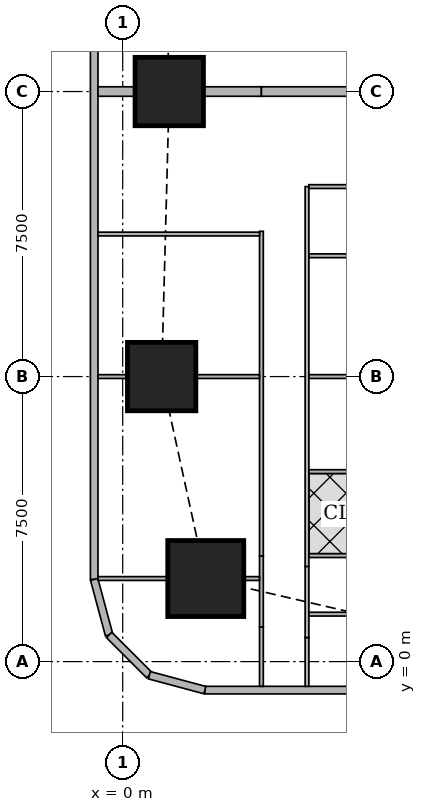
"""IFC4 building model, lengths in metres.
Left out: names, types, materials, properties, quantities, classifications, styles, units other than length and angle.
Written with IfcOpenShell. Run it as: python <this file> out.ifc"""

import sys

from ifc_helpers import new_model, si_unit, direction, frame, frame_2d, origin, origin_2d, place, context, subcontext, project, spatial, rectangle, extrude, element, fill, save


model = new_model("IFC4")
c1 = context("Model", 3, precision=1e-05, world=origin(), true_north=direction((0.0, 1.0)))
c2 = subcontext(c1, "Body", "Model", "MODEL_VIEW")
j1 = project(units=[si_unit("LENGTHUNIT", "METRE"), si_unit("PLANEANGLEUNIT", "RADIAN")], contexts=[c1])
p1 = place(None, origin())
s1 = spatial("IfcSite", under=j1, at=p1, CompositionType="ELEMENT")
p2 = place(p1, origin())
s2 = spatial("IfcBuilding", under=s1, at=p2, CompositionType="ELEMENT")
p3 = place(p2, frame((0.0, 0.0, 169.55)))
s3 = spatial("IfcBuildingStorey", under=s2, at=p3, CompositionType="ELEMENT", Elevation=169.55)
p4 = place(p3, frame((2.186, 2.186, 0.0), z_axis=(0.0, 0.0, 1.0), x_axis=(1.0, 0.0, 0.0)))
e1 = element("IfcColumn", 1, at=p4, inside=s3, PredefinedType="COLUMN", context=c2, shape_type="SweptSolid", body=[
    extrude(rectangle(XDim=2.0, YDim=2.0, at=origin_2d()), origin(), (0.0, 0.0, 1.0), 3.75),
])
for number, where, z_axis, x_axis in (
    (2, (1.025, 7.5, 0.0), (0.0, 0.0, 1.0), (1.0, 0.0, 0.0)),
    (3, (1.225, 15.0, 0.0), (0.0, 0.0, 1.0), (1.0, 0.0, 0.0)),
):
    element("IfcColumn", number, at=place(p3, frame(where, z_axis=z_axis, x_axis=x_axis)), inside=s3, PredefinedType="COLUMN", context=c2, shape_type="SweptSolid", body=[
        extrude(rectangle(XDim=1.8, YDim=1.8, at=origin_2d()), origin(), (0.0, 0.0, 1.0), 3.75),
    ])
p5 = place(p3, frame((2.163, -0.75, 0.0), z_axis=(0.0, 0.0, 1.0), x_axis=(1.0, 0.0, 0.0)))
e4 = element("IfcWall", 4, at=p5, inside=s3, PredefinedType="SOLIDWALL", context=c2, shape_type="SweptSolid", body=[
    extrude(rectangle(XDim=45.628, YDim=0.2, at=frame_2d((22.814, 0.0))), origin(), (0.0, 0.0, 1.0), 3.5),
])
p6 = place(p5, frame((9.537, 0.0, 0.9)))
e5 = element("IfcOpeningElement", 5, at=p6, cuts=e4, PredefinedType="OPENING", context=c2, shape_type="SweptSolid", body=[
    extrude(rectangle(XDim=1.8, YDim=1.5, at=frame_2d((0.9, 0.75))), frame((0.0, 0.11, 0.0), z_axis=(0.0, -1.0, 0.0), x_axis=(1.0, 0.0, 0.0)), (0.0, 0.0, 1.0), 0.22),
])
p7 = place(p5, frame((13.137, 0.0, 0.9)))
e6 = element("IfcOpeningElement", 6, at=p7, cuts=e4, PredefinedType="OPENING", context=c2, shape_type="SweptSolid", body=[
    extrude(rectangle(XDim=1.8, YDim=1.5, at=frame_2d((0.9, 0.75))), frame((0.0, 0.11, 0.0), z_axis=(0.0, -1.0, 0.0), x_axis=(1.0, 0.0, 0.0)), (0.0, 0.0, 1.0), 0.22),
])
p8 = place(p5, frame((16.737, 0.0, 0.9)))
e7 = element("IfcOpeningElement", 7, at=p8, cuts=e4, PredefinedType="OPENING", context=c2, shape_type="SweptSolid", body=[
    extrude(rectangle(XDim=1.8, YDim=1.5, at=frame_2d((0.9, 0.75))), frame((0.0, 0.11, 0.0), z_axis=(0.0, -1.0, 0.0), x_axis=(1.0, 0.0, 0.0)), (0.0, 0.0, 1.0), 0.22),
])
p9 = place(p5, frame((20.337, 0.0, 0.9)))
e8 = element("IfcOpeningElement", 8, at=p9, cuts=e4, PredefinedType="OPENING", context=c2, shape_type="SweptSolid", body=[
    extrude(rectangle(XDim=1.8, YDim=1.5, at=frame_2d((0.9, 0.75))), frame((0.0, 0.11, 0.0), z_axis=(0.0, -1.0, 0.0), x_axis=(1.0, 0.0, 0.0)), (0.0, 0.0, 1.0), 0.22),
])
p10 = place(p5, frame((23.937, 0.0, 0.9)))
e9 = element("IfcOpeningElement", 9, at=p10, cuts=e4, PredefinedType="OPENING", context=c2, shape_type="SweptSolid", body=[
    extrude(rectangle(XDim=1.8, YDim=1.5, at=frame_2d((0.9, 0.75))), frame((0.0, 0.11, 0.0), z_axis=(0.0, -1.0, 0.0), x_axis=(1.0, 0.0, 0.0)), (0.0, 0.0, 1.0), 0.22),
])
p11 = place(p5, frame((27.537, 0.0, 0.9)))
e10 = element("IfcOpeningElement", 10, at=p11, cuts=e4, PredefinedType="OPENING", context=c2, shape_type="SweptSolid", body=[
    extrude(rectangle(XDim=1.8, YDim=1.5, at=frame_2d((0.9, 0.75))), frame((0.0, 0.11, 0.0), z_axis=(0.0, -1.0, 0.0), x_axis=(1.0, 0.0, 0.0)), (0.0, 0.0, 1.0), 0.22),
])
p12 = place(p5, frame((31.137, 0.0, 0.9)))
e11 = element("IfcOpeningElement", 11, at=p12, cuts=e4, PredefinedType="OPENING", context=c2, shape_type="SweptSolid", body=[
    extrude(rectangle(XDim=1.8, YDim=1.5, at=frame_2d((0.9, 0.75))), frame((0.0, 0.11, 0.0), z_axis=(0.0, -1.0, 0.0), x_axis=(1.0, 0.0, 0.0)), (0.0, 0.0, 1.0), 0.22),
])
p13 = place(p5, frame((34.737, 0.0, 0.9)))
e12 = element("IfcOpeningElement", 12, at=p13, cuts=e4, PredefinedType="OPENING", context=c2, shape_type="SweptSolid", body=[
    extrude(rectangle(XDim=1.8, YDim=1.5, at=frame_2d((0.9, 0.75))), frame((0.0, 0.11, 0.0), z_axis=(0.0, -1.0, 0.0), x_axis=(1.0, 0.0, 0.0)), (0.0, 0.0, 1.0), 0.22),
])
p14 = place(p3, frame((-0.75, 42.837, 0.0), z_axis=(0.0, 0.0, 1.0), x_axis=(0.0, -1.0, 0.0)))
e13 = element("IfcWall", 13, at=p14, inside=s3, PredefinedType="SOLIDWALL", context=c2, shape_type="SweptSolid", body=[
    extrude(rectangle(XDim=40.674, YDim=0.2, at=frame_2d((20.337, 0.0))), origin(), (0.0, 0.0, 1.0), 3.5),
])
p15 = place(p14, frame((1.78, 0.0, 0.9)))
e14 = element("IfcOpeningElement", 14, at=p15, cuts=e13, PredefinedType="OPENING", context=c2, shape_type="SweptSolid", body=[
    extrude(rectangle(XDim=1.8, YDim=1.5, at=frame_2d((0.9, 0.75))), frame((0.0, 0.11, 0.0), z_axis=(0.0, -1.0, 0.0), x_axis=(1.0, 0.0, 0.0)), (0.0, 0.0, 1.0), 0.22),
])
p16 = place(p14, frame((6.312, 0.0, 0.9)))
e15 = element("IfcOpeningElement", 15, at=p16, cuts=e13, PredefinedType="OPENING", context=c2, shape_type="SweptSolid", body=[
    extrude(rectangle(XDim=1.8, YDim=1.5, at=frame_2d((0.9, 0.75))), frame((0.0, 0.11, 0.0), z_axis=(0.0, -1.0, 0.0), x_axis=(1.0, 0.0, 0.0)), (0.0, 0.0, 1.0), 0.22),
])
p17 = place(p14, frame((10.062, 0.0, 0.9)))
e16 = element("IfcOpeningElement", 16, at=p17, cuts=e13, PredefinedType="OPENING", context=c2, shape_type="SweptSolid", body=[
    extrude(rectangle(XDim=1.8, YDim=1.5, at=frame_2d((0.9, 0.75))), frame((0.0, 0.11, 0.0), z_axis=(0.0, -1.0, 0.0), x_axis=(1.0, 0.0, 0.0)), (0.0, 0.0, 1.0), 0.22),
])
p18 = place(p14, frame((13.812, 0.0, 0.9)))
e17 = element("IfcOpeningElement", 17, at=p18, cuts=e13, PredefinedType="OPENING", context=c2, shape_type="SweptSolid", body=[
    extrude(rectangle(XDim=1.8, YDim=1.5, at=frame_2d((0.9, 0.75))), frame((0.0, 0.11, 0.0), z_axis=(0.0, -1.0, 0.0), x_axis=(1.0, 0.0, 0.0)), (0.0, 0.0, 1.0), 0.22),
])
p19 = place(p14, frame((17.562, 0.0, 0.9)))
e18 = element("IfcOpeningElement", 18, at=p19, cuts=e13, PredefinedType="OPENING", context=c2, shape_type="SweptSolid", body=[
    extrude(rectangle(XDim=1.8, YDim=1.5, at=frame_2d((0.9, 0.75))), frame((0.0, 0.11, 0.0), z_axis=(0.0, -1.0, 0.0), x_axis=(1.0, 0.0, 0.0)), (0.0, 0.0, 1.0), 0.22),
])
p20 = place(p14, frame((21.312, 0.0, 0.9)))
e19 = element("IfcOpeningElement", 19, at=p20, cuts=e13, PredefinedType="OPENING", context=c2, shape_type="SweptSolid", body=[
    extrude(rectangle(XDim=1.8, YDim=1.5, at=frame_2d((0.9, 0.75))), frame((0.0, 0.11, 0.0), z_axis=(0.0, -1.0, 0.0), x_axis=(1.0, 0.0, 0.0)), (0.0, 0.0, 1.0), 0.22),
])
p21 = place(p14, frame((25.062, 0.0, 0.9)))
e20 = element("IfcOpeningElement", 20, at=p21, cuts=e13, PredefinedType="OPENING", context=c2, shape_type="SweptSolid", body=[
    extrude(rectangle(XDim=1.8, YDim=1.5, at=frame_2d((0.9, 0.75))), frame((0.0, 0.11, 0.0), z_axis=(0.0, -1.0, 0.0), x_axis=(1.0, 0.0, 0.0)), (0.0, 0.0, 1.0), 0.22),
])
p22 = place(p14, frame((28.812, 0.0, 0.9)))
e21 = element("IfcOpeningElement", 21, at=p22, cuts=e13, PredefinedType="OPENING", context=c2, shape_type="SweptSolid", body=[
    extrude(rectangle(XDim=1.8, YDim=1.5, at=frame_2d((0.9, 0.75))), frame((0.0, 0.11, 0.0), z_axis=(0.0, -1.0, 0.0), x_axis=(1.0, 0.0, 0.0)), (0.0, 0.0, 1.0), 0.22),
])
p23 = place(p14, frame((32.562, 0.0, 0.9)))
e22 = element("IfcOpeningElement", 22, at=p23, cuts=e13, PredefinedType="OPENING", context=c2, shape_type="SweptSolid", body=[
    extrude(rectangle(XDim=1.8, YDim=1.5, at=frame_2d((0.9, 0.75))), frame((0.0, 0.11, 0.0), z_axis=(0.0, -1.0, 0.0), x_axis=(1.0, 0.0, 0.0)), (0.0, 0.0, 1.0), 0.22),
])
p24 = place(p14, frame((37.094, 0.0, 0.9)))
e23 = element("IfcOpeningElement", 23, at=p24, cuts=e13, PredefinedType="OPENING", context=c2, shape_type="SweptSolid", body=[
    extrude(rectangle(XDim=1.8, YDim=1.5, at=frame_2d((0.9, 0.75))), frame((0.0, 0.11, 0.0), z_axis=(0.0, -1.0, 0.0), x_axis=(1.0, 0.0, 0.0)), (0.0, 0.0, 1.0), 0.22),
])
p25 = place(p3, frame((-0.75, 2.163, 0.0), z_axis=(0.0, 0.0, 1.0), x_axis=(0.259168954497, -0.965832000415, 0.0)))
e24 = element("IfcWall", 24, at=p25, inside=s3, PredefinedType="SOLIDWALL", context=c2, shape_type="SweptSolid", body=[
    extrude(rectangle(XDim=1.513, YDim=0.2, at=frame_2d((0.756, 0.0))), origin(), (0.0, 0.0, 1.0), 3.5),
])
p26 = place(p3, frame((-0.358, 0.702, 0.0), z_axis=(0.0, 0.0, 1.0), x_axis=(0.707106781187, -0.707106781187, 0.0)))
e25 = element("IfcWall", 25, at=p26, inside=s3, PredefinedType="SOLIDWALL", context=c2, shape_type="SweptSolid", body=[
    extrude(rectangle(XDim=1.499, YDim=0.2, at=frame_2d((0.75, 0.0))), origin(), (0.0, 0.0, 1.0), 3.5),
])
p27 = place(p3, frame((0.702, -0.358, 0.0), z_axis=(0.0, 0.0, 1.0), x_axis=(0.965832000415, -0.259168954497, 0.0)))
e26 = element("IfcWall", 26, at=p27, inside=s3, PredefinedType="SOLIDWALL", context=c2, shape_type="SweptSolid", body=[
    extrude(rectangle(XDim=1.513, YDim=0.2, at=frame_2d((0.756, 0.0))), origin(), (0.0, 0.0, 1.0), 3.5),
])
p28 = place(p3, frame((3.65, -0.65, 0.0), z_axis=(0.0, 0.0, 1.0), x_axis=(0.0, 1.0, 0.0)))
e27 = element("IfcWall", 27, at=p28, inside=s3, PredefinedType="PARTITIONING", context=c2, shape_type="SweptSolid", body=[
    extrude(rectangle(XDim=1.562, YDim=0.1, at=frame_2d((0.781, 0.0))), origin(), (0.0, 0.0, 1.0), 3.5),
])
p29 = place(p3, frame((3.65, 0.912, 0.0), z_axis=(0.0, 0.0, 1.0), x_axis=(0.0, 1.0, 0.0)))
e28 = element("IfcWall", 28, at=p29, inside=s3, PredefinedType="PARTITIONING", context=c2, shape_type="SweptSolid", body=[
    extrude(rectangle(XDim=1.87, YDim=0.1, at=frame_2d((0.935, 0.0))), origin(), (0.0, 0.0, 1.0), 2.1),
])
p30 = place(p3, frame((3.65, 2.782, 0.0), z_axis=(0.0, 0.0, 1.0), x_axis=(0.0, 1.0, 0.0)))
e29 = element("IfcWall", 29, at=p30, inside=s3, PredefinedType="PARTITIONING", context=c2, shape_type="SweptSolid", body=[
    extrude(rectangle(XDim=8.541, YDim=0.1, at=frame_2d((4.271, 0.0))), origin(), (0.0, 0.0, 1.0), 3.5),
])
p31 = place(p30, frame((7.368, 0.0, 0.0)))
e30 = element("IfcOpeningElement", 30, at=p31, cuts=e29, PredefinedType="OPENING", context=c2, shape_type="SweptSolid", body=[
    extrude(rectangle(XDim=0.9, YDim=2.1, at=frame_2d((0.45, 1.05))), frame((0.0, 0.06, 0.0), z_axis=(0.0, -1.0, 0.0), x_axis=(1.0, 0.0, 0.0)), (0.0, 0.0, 1.0), 0.12),
])
p32 = place(p30, frame((3.618, 0.0, 0.0)))
e31 = element("IfcOpeningElement", 31, at=p32, cuts=e29, PredefinedType="OPENING", context=c2, shape_type="SweptSolid", body=[
    extrude(rectangle(XDim=0.9, YDim=2.1, at=frame_2d((0.45, 1.05))), frame((0.0, 0.06, 0.0), z_axis=(0.0, -1.0, 0.0), x_axis=(1.0, 0.0, 0.0)), (0.0, 0.0, 1.0), 0.12),
])
p33 = place(p3, frame((4.85, -0.65, 0.0), z_axis=(0.0, 0.0, 1.0), x_axis=(0.0, 1.0, 0.0)))
e32 = element("IfcWall", 32, at=p33, inside=s3, PredefinedType="PARTITIONING", context=c2, shape_type="SweptSolid", body=[
    extrude(rectangle(XDim=1.284, YDim=0.1, at=frame_2d((0.642, 0.0))), origin(), (0.0, 0.0, 1.0), 3.5),
])
p34 = place(p33, frame((0.234, 0.0, 0.0)))
e33 = element("IfcOpeningElement", 33, at=p34, cuts=e32, PredefinedType="OPENING", context=c2, shape_type="SweptSolid", body=[
    extrude(rectangle(XDim=0.9, YDim=2.1, at=frame_2d((0.45, 1.05))), frame((0.0, 0.06, 0.0), z_axis=(0.0, -1.0, 0.0), x_axis=(1.0, 0.0, 0.0)), (0.0, 0.0, 1.0), 0.12),
])
p35 = place(p3, frame((4.85, 0.634, 0.0), z_axis=(0.0, 0.0, 1.0), x_axis=(0.0, 1.0, 0.0)))
e34 = element("IfcWall", 34, at=p35, inside=s3, PredefinedType="PARTITIONING", context=c2, shape_type="SweptSolid", body=[
    extrude(rectangle(XDim=1.871, YDim=0.1, at=frame_2d((0.936, 0.0))), origin(), (0.0, 0.0, 1.0), 2.1),
])
p36 = place(p3, frame((4.85, 2.505, 0.0), z_axis=(0.0, 0.0, 1.0), x_axis=(0.0, 1.0, 0.0)))
e35 = element("IfcWall", 35, at=p36, inside=s3, PredefinedType="PARTITIONING", context=c2, shape_type="SweptSolid", body=[
    extrude(rectangle(XDim=9.994, YDim=0.1, at=frame_2d((4.997, 0.0))), origin(), (0.0, 0.0, 1.0), 3.5),
])
p37 = place(p36, frame((8.634, 0.0, 0.0)))
e36 = element("IfcOpeningElement", 36, at=p37, cuts=e35, PredefinedType="OPENING", context=c2, shape_type="SweptSolid", body=[
    extrude(rectangle(XDim=0.9, YDim=2.1, at=frame_2d((0.45, 1.05))), frame((0.0, 0.06, 0.0), z_axis=(0.0, -1.0, 0.0), x_axis=(1.0, 0.0, 0.0)), (0.0, 0.0, 1.0), 0.12),
])
p38 = place(p36, frame((3.294, 0.0, 0.0)))
e37 = element("IfcOpeningElement", 37, at=p38, cuts=e35, PredefinedType="OPENING", context=c2, shape_type="SweptSolid", body=[
    extrude(rectangle(XDim=0.9, YDim=2.1, at=frame_2d((0.45, 1.05))), frame((0.0, 0.06, 0.0), z_axis=(0.0, -1.0, 0.0), x_axis=(1.0, 0.0, 0.0)), (0.0, 0.0, 1.0), 0.12),
])
p39 = place(p36, frame((0.939, 0.0, 0.0)))
e38 = element("IfcOpeningElement", 38, at=p39, cuts=e35, PredefinedType="OPENING", context=c2, shape_type="SweptSolid", body=[
    extrude(rectangle(XDim=0.9, YDim=2.1, at=frame_2d((0.45, 1.05))), frame((0.0, 0.06, 0.0), z_axis=(0.0, -1.0, 0.0), x_axis=(1.0, 0.0, 0.0)), (0.0, 0.0, 1.0), 0.12),
])
p40 = place(p36, frame((6.135, 0.0, 0.0)))
e39 = element("IfcOpeningElement", 39, at=p40, cuts=e35, PredefinedType="OPENING", context=c2, shape_type="SweptSolid", body=[
    extrude(rectangle(XDim=0.9, YDim=2.1, at=frame_2d((0.45, 1.05))), frame((0.0, 0.06, 0.0), z_axis=(0.0, -1.0, 0.0), x_axis=(1.0, 0.0, 0.0)), (0.0, 0.0, 1.0), 0.12),
])
p41 = place(p3, frame((-0.65, 2.186, 0.0), z_axis=(0.0, 0.0, 1.0), x_axis=(1.0, 0.0, 0.0)))
e40 = element("IfcWall", 40, at=p41, inside=s3, PredefinedType="PARTITIONING", context=c2, shape_type="SweptSolid", body=[
    extrude(rectangle(XDim=1.835, YDim=0.1, at=frame_2d((0.917, 0.0))), origin(), (0.0, 0.0, 1.0), 3.5),
])
p42 = place(p3, frame((3.187, 2.186, 0.0), z_axis=(0.0, 0.0, 1.0), x_axis=(1.0, 0.0, 0.0)))
e41 = element("IfcWall", 41, at=p42, inside=s3, PredefinedType="PARTITIONING", context=c2, shape_type="SweptSolid", body=[
    extrude(rectangle(XDim=0.413, YDim=0.1, at=frame_2d((0.207, 0.0))), origin(), (0.0, 0.0, 1.0), 2.1),
])
p43 = place(p3, frame((-0.65, 7.5, 0.0), z_axis=(0.0, 0.0, 1.0), x_axis=(1.0, 0.0, 0.0)))
e42 = element("IfcWall", 42, at=p43, inside=s3, PredefinedType="PARTITIONING", context=c2, shape_type="SweptSolid", body=[
    extrude(rectangle(XDim=0.774, YDim=0.1, at=frame_2d((0.387, 0.0))), origin(), (0.0, 0.0, 1.0), 3.5),
])
p44 = place(p3, frame((1.926, 7.5, 0.0), z_axis=(0.0, 0.0, 1.0), x_axis=(1.0, 0.0, 0.0)))
e43 = element("IfcWall", 43, at=p44, inside=s3, PredefinedType="PARTITIONING", context=c2, shape_type="SweptSolid", body=[
    extrude(rectangle(XDim=1.674, YDim=0.1, at=frame_2d((0.837, 0.0))), origin(), (0.0, 0.0, 1.0), 2.1),
])
p45 = place(p3, frame((-0.65, 11.25, 0.0), z_axis=(0.0, 0.0, 1.0), x_axis=(1.0, 0.0, 0.0)))
e44 = element("IfcWall", 44, at=p45, inside=s3, PredefinedType="PARTITIONING", context=c2, shape_type="SweptSolid", body=[
    extrude(rectangle(XDim=4.25, YDim=0.1, at=frame_2d((2.125, 0.0))), origin(), (0.0, 0.0, 1.0), 2.1),
])
p46 = place(p3, frame((4.9, 4.999, 0.0), z_axis=(0.0, 0.0, 1.0), x_axis=(1.0, 0.0, 0.0)))
e45 = element("IfcWall", 45, at=p46, inside=s3, PredefinedType="PARTITIONING", context=c2, shape_type="SweptSolid", body=[
    extrude(rectangle(XDim=3.275, YDim=0.1, at=frame_2d((1.638, 0.0))), origin(), (0.0, 0.0, 1.0), 3.5),
])
p47 = place(p3, frame((4.9, 7.5, 0.0), z_axis=(0.0, 0.0, 1.0), x_axis=(1.0, 0.0, 0.0)))
e46 = element("IfcWall", 46, at=p47, inside=s3, PredefinedType="PARTITIONING", context=c2, shape_type="SweptSolid", body=[
    extrude(rectangle(XDim=1.549, YDim=0.1, at=frame_2d((0.774, 0.0))), origin(), (0.0, 0.0, 1.0), 3.5),
])
p48 = place(p3, frame((4.9, 12.499, 0.0), z_axis=(0.0, 0.0, 1.0), x_axis=(1.0, 0.0, 0.0)))
e47 = element("IfcWall", 47, at=p48, inside=s3, PredefinedType="PARTITIONING", context=c2, shape_type="SweptSolid", body=[
    extrude(rectangle(XDim=3.275, YDim=0.1, at=frame_2d((1.638, 0.0))), origin(), (0.0, 0.0, 1.0), 3.5),
])
p49 = place(p3, frame((4.9, 1.249, 0.0), z_axis=(0.0, 0.0, 1.0), x_axis=(1.0, 0.0, 0.0)))
e48 = element("IfcWall", 48, at=p49, inside=s3, PredefinedType="PARTITIONING", context=c2, shape_type="SweptSolid", body=[
    extrude(rectangle(XDim=1.399, YDim=0.1, at=frame_2d((0.7, 0.0))), origin(), (0.0, 0.0, 1.0), 2.1),
])
p50 = place(p3, frame((4.9, 10.679, 0.0), z_axis=(0.0, 0.0, 1.0), x_axis=(1.0, 0.0, 0.0)))
e49 = element("IfcWall", 49, at=p50, inside=s3, PredefinedType="PARTITIONING", context=c2, shape_type="SweptSolid", body=[
    extrude(rectangle(XDim=3.275, YDim=0.1, at=frame_2d((1.638, 0.0))), origin(), (0.0, 0.0, 1.0), 3.5),
])
p51 = place(p3, frame((4.9, 2.789, 0.0), z_axis=(0.0, 0.0, 1.0), x_axis=(1.0, 0.0, 0.0)))
e50 = element("IfcWall", 50, at=p51, inside=s3, PredefinedType="PARTITIONING", context=c2, shape_type="SweptSolid", body=[
    extrude(rectangle(XDim=3.275, YDim=0.1, at=frame_2d((1.638, 0.0))), origin(), (0.0, 0.0, 1.0), 3.5),
])
p52 = place(p51, frame((0.45, 0.0, 0.0)))
e51 = element("IfcOpeningElement", 51, at=p52, cuts=e50, PredefinedType="OPENING", context=c2, shape_type="SweptSolid", body=[
    extrude(rectangle(XDim=0.9, YDim=2.1, at=frame_2d((0.45, 1.05))), frame((0.0, 0.06, 0.0), z_axis=(0.0, -1.0, 0.0), x_axis=(1.0, 0.0, 0.0)), (0.0, 0.0, 1.0), 0.12),
])
p53 = place(p3, frame((-0.65, 15.0, 0.0), z_axis=(0.0, 0.0, 1.0), x_axis=(1.0, 0.0, 0.0)))
e52 = element("IfcWall", 52, at=p53, inside=s3, PredefinedType="SOLIDWALL", context=c2, shape_type="SweptSolid", body=[
    extrude(rectangle(XDim=0.974, YDim=0.25, at=frame_2d((0.487, 0.0))), origin(), (0.0, 0.0, 1.0), 2.1),
])
p54 = place(p3, frame((2.126, 15.0, 0.0), z_axis=(0.0, 0.0, 1.0), x_axis=(1.0, 0.0, 0.0)))
e53 = element("IfcWall", 53, at=p54, inside=s3, PredefinedType="SOLIDWALL", context=c2, shape_type="SweptSolid", body=[
    extrude(rectangle(XDim=1.524, YDim=0.25, at=frame_2d((0.762, 0.0))), origin(), (0.0, 0.0, 1.0), 2.1),
])
p55 = place(p3, frame((3.65, 15.0, 0.0), z_axis=(0.0, 0.0, 1.0), x_axis=(1.0, 0.0, 0.0)))
e54 = element("IfcWall", 54, at=p55, inside=s3, PredefinedType="SOLIDWALL", context=c2, shape_type="SweptSolid", body=[
    extrude(rectangle(XDim=2.799, YDim=0.25, at=frame_2d((1.399, 0.0))), origin(), (0.0, 0.0, 1.0), 3.5),
])
p56 = place(p21, origin())
e55 = element("IfcWindow", 55, at=p56, inside=s3, PartitioningType="SINGLE_PANEL", PredefinedType="WINDOW", context=c2, shape_type="SweptSolid", body=[
    extrude(rectangle(XDim=1.8, YDim=1.5, at=frame_2d((0.9, 0.75))), frame((0.0, 0.03, 0.0), z_axis=(0.0, -1.0, 0.0), x_axis=(1.0, 0.0, 0.0)), (0.0, 0.0, 1.0), 0.06),
])
fill(e20, e55)
p57 = place(p22, origin())
e56 = element("IfcWindow", 56, at=p57, inside=s3, PartitioningType="SINGLE_PANEL", PredefinedType="WINDOW", context=c2, shape_type="SweptSolid", body=[
    extrude(rectangle(XDim=1.8, YDim=1.5, at=frame_2d((0.9, 0.75))), frame((0.0, 0.03, 0.0), z_axis=(0.0, -1.0, 0.0), x_axis=(1.0, 0.0, 0.0)), (0.0, 0.0, 1.0), 0.06),
])
fill(e21, e56)
p58 = place(p23, origin())
e57 = element("IfcWindow", 57, at=p58, inside=s3, PartitioningType="SINGLE_PANEL", PredefinedType="WINDOW", context=c2, shape_type="SweptSolid", body=[
    extrude(rectangle(XDim=1.8, YDim=1.5, at=frame_2d((0.9, 0.75))), frame((0.0, 0.03, 0.0), z_axis=(0.0, -1.0, 0.0), x_axis=(1.0, 0.0, 0.0)), (0.0, 0.0, 1.0), 0.06),
])
fill(e22, e57)
p59 = place(p24, origin())
e58 = element("IfcWindow", 58, at=p59, inside=s3, PartitioningType="SINGLE_PANEL", PredefinedType="WINDOW", context=c2, shape_type="SweptSolid", body=[
    extrude(rectangle(XDim=1.8, YDim=1.5, at=frame_2d((0.9, 0.75))), frame((0.0, 0.03, 0.0), z_axis=(0.0, -1.0, 0.0), x_axis=(1.0, 0.0, 0.0)), (0.0, 0.0, 1.0), 0.06),
])
fill(e23, e58)
p60 = place(p31, origin())
e59 = element("IfcDoor", 59, at=p60, inside=s3, OperationType="SINGLE_SWING_RIGHT", PredefinedType="DOOR", context=c2, shape_type="SweptSolid", body=[
    extrude(rectangle(XDim=0.9, YDim=2.1, at=frame_2d((0.45, 1.05))), frame((0.0, 0.025, 0.0), z_axis=(0.0, -1.0, 0.0), x_axis=(1.0, 0.0, 0.0)), (0.0, 0.0, 1.0), 0.05),
])
fill(e30, e59)
p61 = place(p32, origin())
e60 = element("IfcDoor", 60, at=p61, inside=s3, OperationType="SINGLE_SWING_RIGHT", PredefinedType="DOOR", context=c2, shape_type="SweptSolid", body=[
    extrude(rectangle(XDim=0.9, YDim=2.1, at=frame_2d((0.45, 1.05))), frame((0.0, 0.025, 0.0), z_axis=(0.0, -1.0, 0.0), x_axis=(1.0, 0.0, 0.0)), (0.0, 0.0, 1.0), 0.05),
])
fill(e31, e60)
p62 = place(p37, origin())
e61 = element("IfcDoor", 61, at=p62, inside=s3, OperationType="SINGLE_SWING_LEFT", PredefinedType="DOOR", context=c2, shape_type="SweptSolid", body=[
    extrude(rectangle(XDim=0.9, YDim=2.1, at=frame_2d((0.45, 1.05))), frame((0.0, 0.025, 0.0), z_axis=(0.0, -1.0, 0.0), x_axis=(1.0, 0.0, 0.0)), (0.0, 0.0, 1.0), 0.05),
])
fill(e36, e61)
p63 = place(p38, origin())
e62 = element("IfcDoor", 62, at=p63, inside=s3, OperationType="SINGLE_SWING_RIGHT", PredefinedType="DOOR", context=c2, shape_type="SweptSolid", body=[
    extrude(rectangle(XDim=0.9, YDim=2.1, at=frame_2d((0.45, 1.05))), frame((0.0, 0.025, 0.0), z_axis=(0.0, -1.0, 0.0), x_axis=(1.0, 0.0, 0.0)), (0.0, 0.0, 1.0), 0.05),
])
fill(e37, e62)
p64 = place(p39, origin())
e63 = element("IfcDoor", 63, at=p64, inside=s3, OperationType="SINGLE_SWING_RIGHT", PredefinedType="DOOR", context=c2, shape_type="SweptSolid", body=[
    extrude(rectangle(XDim=0.9, YDim=2.1, at=frame_2d((0.45, 1.05))), frame((0.0, 0.025, 0.0), z_axis=(0.0, -1.0, 0.0), x_axis=(1.0, 0.0, 0.0)), (0.0, 0.0, 1.0), 0.05),
])
fill(e38, e63)
p65 = place(p34, origin())
e64 = element("IfcDoor", 64, at=p65, inside=s3, OperationType="SINGLE_SWING_LEFT", PredefinedType="DOOR", context=c2, shape_type="SweptSolid", body=[
    extrude(rectangle(XDim=0.9, YDim=2.1, at=frame_2d((0.45, 1.05))), frame((0.0, 0.025, 0.0), z_axis=(0.0, -1.0, 0.0), x_axis=(1.0, 0.0, 0.0)), (0.0, 0.0, 1.0), 0.05),
])
fill(e33, e64)
p66 = place(p40, origin())
e65 = element("IfcDoor", 65, at=p66, inside=s3, OperationType="SINGLE_SWING_LEFT", PredefinedType="DOOR", context=c2, shape_type="SweptSolid", body=[
    extrude(rectangle(XDim=0.9, YDim=2.1, at=frame_2d((0.45, 1.05))), frame((0.0, 0.025, 0.0), z_axis=(0.0, -1.0, 0.0), x_axis=(1.0, 0.0, 0.0)), (0.0, 0.0, 1.0), 0.05),
])
fill(e39, e65)
p67 = place(p52, origin())
e66 = element("IfcDoor", 66, at=p67, inside=s3, OperationType="SINGLE_SWING_RIGHT", PredefinedType="DOOR", context=c2, shape_type="SweptSolid", body=[
    extrude(rectangle(XDim=0.9, YDim=2.1, at=frame_2d((0.45, 1.05))), frame((0.0, 0.025, 0.0), z_axis=(0.0, -1.0, 0.0), x_axis=(1.0, 0.0, 0.0)), (0.0, 0.0, 1.0), 0.05),
])
fill(e51, e66)
save(model, sys.argv[1])
